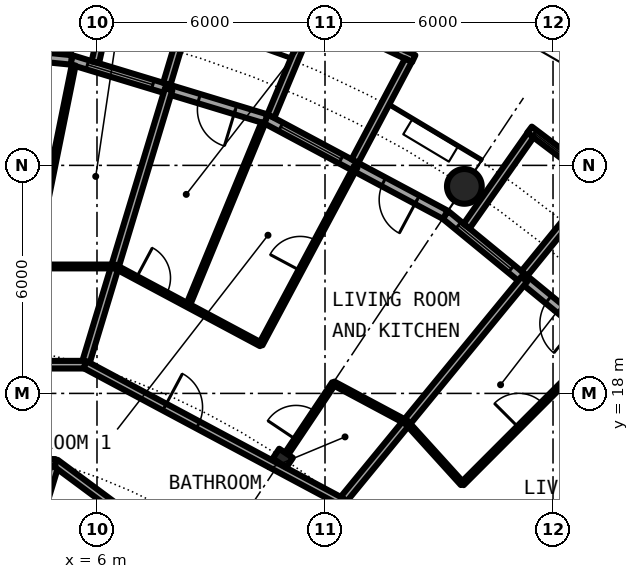
"""IFC4 building model, lengths in metres.
Left out: names, types, materials, properties, quantities, classifications, styles, units other than length and angle.
Written with IfcOpenShell. Run it as: python <this file> out.ifc"""

import sys

from ifc_helpers import new_model, si_unit, direction, frame, frame_2d, origin, origin_2d, place, context, subcontext, project, spatial, rectangle, circle, hollow_circle, i_section, extrude, element, fill, save


model = new_model("IFC4")
c1 = context("Model", 3, precision=1e-05, world=origin(), true_north=direction((0.0, 1.0)))
c2 = subcontext(c1, "Body", "Model", "MODEL_VIEW")
j1 = project(units=[si_unit("LENGTHUNIT", "METRE"), si_unit("PLANEANGLEUNIT", "RADIAN")], contexts=[c1])
p1 = place(None, origin())
s1 = spatial("IfcSite", under=j1, at=p1, CompositionType="ELEMENT")
p2 = place(p1, origin())
s2 = spatial("IfcBuilding", under=s1, at=p2, CompositionType="ELEMENT")
p3 = place(p2, frame((0.0, 0.0, 120.8)))
s3 = spatial("IfcBuildingStorey", under=s2, at=p3, CompositionType="ELEMENT", Elevation=120.8)
p4 = place(p3, frame((15.667, 23.448, 0.0), z_axis=(0.0, 0.0, 1.0), x_axis=(1.0, 0.0, 0.0)))
e1 = element("IfcColumn", 1, at=p4, inside=s3, PredefinedType="COLUMN", context=c2, shape_type="SweptSolid", body=[
    extrude(hollow_circle(Radius=0.457, WallThickness=0.04, at=origin_2d()), origin(), (0.0, 0.0, 1.0), 3.05),
])
p5 = place(p3, frame((10.889, 16.297, 0.0), z_axis=(0.0, 0.0, 1.0), x_axis=(0.55557023302, 0.831469612303, 0.0)))
e2 = element("IfcColumn", 2, at=p5, inside=s3, PredefinedType="COLUMN", context=c2, shape_type="SweptSolid", body=[
    extrude(i_section(OverallWidth=0.307, OverallDepth=0.432, WebThickness=0.021, FlangeThickness=0.04, FilletRadius=0.027, at=origin_2d()), origin(), (0.0, 0.0, 1.0), 3.05),
])
p6 = place(p3, frame((19.304, 19.304, 0.0), z_axis=(0.0, 0.0, 1.0), x_axis=(-0.773019449054, 0.634382322723, 0.0)))
e3 = element("IfcWall", 3, at=p6, inside=s3, PredefinedType="SOLIDWALL", context=c2, shape_type="SweptSolid", body=[
    extrude(rectangle(XDim=5.352, YDim=0.25, at=frame_2d((2.676, 0.0))), origin(), (0.0, 0.0, 1.0), 2.7),
])
p7 = place(p6, frame((0.841, 0.0, 0.0)))
e4 = element("IfcOpeningElement", 4, at=p7, cuts=e3, PredefinedType="OPENING", context=c2, shape_type="SweptSolid", body=[
    extrude(rectangle(XDim=1.0, YDim=2.2, at=frame_2d((0.5, 1.1))), frame((0.0, 0.135, 0.0), z_axis=(0.0, -1.0, 0.0), x_axis=(1.0, 0.0, 0.0)), (0.0, 0.0, 1.0), 0.27),
])
p8 = place(p6, frame((3.111, 0.0, 0.3)))
e5 = element("IfcOpeningElement", 5, at=p8, cuts=e3, PredefinedType="OPENING", context=c2, shape_type="SweptSolid", body=[
    extrude(rectangle(XDim=1.8, YDim=2.1, at=frame_2d((0.9, 1.05))), frame((0.0, 0.135, 0.0), z_axis=(0.0, -1.0, 0.0), x_axis=(1.0, 0.0, 0.0)), (0.0, 0.0, 1.0), 0.27),
])
p9 = place(p3, frame((19.289, 23.497, -0.03), z_axis=(0.0, 0.0, 1.0), x_axis=(-0.797456837111, 0.603375996329, 0.0)))
e6 = element("IfcWall", 6, at=p9, inside=s3, PredefinedType="SOLIDWALL", context=c2, shape_type="SweptSolid", body=[
    extrude(rectangle(XDim=2.391, YDim=0.2, at=frame_2d((1.196, 0.0))), origin(), (0.0, 0.0, 1.0), 2.73),
])
p10 = place(p9, frame((0.156, 0.0, 0.33)))
e7 = element("IfcOpeningElement", 7, at=p10, cuts=e6, PredefinedType="OPENING", context=c2, shape_type="SweptSolid", body=[
    extrude(circle(Radius=1.04, at=frame_2d((1.04, 1.04))), frame((0.0, 0.11, 0.0), z_axis=(0.0, -1.0, 0.0), x_axis=(1.0, 0.0, 0.0)), (0.0, 0.0, 1.0), 0.22),
])
p11 = place(p3, frame((17.246, 21.155, -0.03), z_axis=(0.0, 0.0, 1.0), x_axis=(0.631741648902, 0.775179004516, 0.0)))
e8 = element("IfcWall", 8, at=p11, inside=s3, PredefinedType="SOLIDWALL", context=c2, shape_type="SweptSolid", body=[
    extrude(rectangle(XDim=3.006, YDim=0.2, at=frame_2d((1.503, 0.0))), origin(), (0.0, 0.0, 1.0), 2.73),
])
p12 = place(p3, frame((15.726, 22.402, -0.03), z_axis=(0.0, 0.0, 1.0), x_axis=(0.574826383135, 0.818275399393, 0.0)))
e9 = element("IfcWall", 9, at=p12, inside=s3, PredefinedType="SOLIDWALL", context=c2, shape_type="SweptSolid", body=[
    extrude(rectangle(XDim=2.929, YDim=0.2, at=frame_2d((1.465, 0.0))), origin(), (0.0, 0.0, 1.0), 2.73),
])
p13 = place(p3, frame((15.167, 22.699, 0.0), z_axis=(0.0, 0.0, 1.0), x_axis=(-0.881915646801, 0.471407246368, 0.0)))
e10 = element("IfcWall", 10, at=p13, inside=s3, PredefinedType="SOLIDWALL", context=c2, shape_type="SweptSolid", body=[
    extrude(rectangle(XDim=5.352, YDim=0.25, at=frame_2d((2.676, 0.0))), origin(), (0.0, 0.0, 1.0), 2.7),
])
p14 = place(p13, frame((0.841, 0.0, 0.0)))
e11 = element("IfcOpeningElement", 11, at=p14, cuts=e10, PredefinedType="OPENING", context=c2, shape_type="SweptSolid", body=[
    extrude(rectangle(XDim=1.0, YDim=2.2, at=frame_2d((0.5, 1.1))), frame((0.0, 0.135, 0.0), z_axis=(0.0, -1.0, 0.0), x_axis=(1.0, 0.0, 0.0)), (0.0, 0.0, 1.0), 0.27),
])
p15 = place(p13, frame((3.111, 0.0, 0.3)))
e12 = element("IfcOpeningElement", 12, at=p15, cuts=e10, PredefinedType="OPENING", context=c2, shape_type="SweptSolid", body=[
    extrude(rectangle(XDim=1.8, YDim=2.1, at=frame_2d((0.9, 1.05))), frame((0.0, 0.135, 0.0), z_axis=(0.0, -1.0, 0.0), x_axis=(1.0, 0.0, 0.0)), (0.0, 0.0, 1.0), 0.27),
])
p16 = place(p3, frame((14.335, 26.808, -0.03), z_axis=(0.0, 0.0, 1.0), x_axis=(-0.904000060331, 0.427532327342, 0.0)))
e13 = element("IfcWall", 13, at=p16, inside=s3, PredefinedType="SOLIDWALL", context=c2, shape_type="SweptSolid", body=[
    extrude(rectangle(XDim=2.993, YDim=0.2, at=frame_2d((1.497, 0.0))), origin(), (0.0, 0.0, 1.0), 2.73),
])
p17 = place(p16, frame((0.457, 0.0, 0.33)))
e14 = element("IfcOpeningElement", 14, at=p17, cuts=e13, PredefinedType="OPENING", context=c2, shape_type="SweptSolid", body=[
    extrude(circle(Radius=1.04, at=frame_2d((1.04, 1.04))), frame((0.0, 0.11, 0.0), z_axis=(0.0, -1.0, 0.0), x_axis=(1.0, 0.0, 0.0)), (0.0, 0.0, 1.0), 0.22),
])
p18 = place(p3, frame((12.787, 24.113, -0.03), z_axis=(0.0, 0.0, 1.0), x_axis=(0.468365282436, 0.883534924159, 0.0)))
e15 = element("IfcWall", 15, at=p18, inside=s3, PredefinedType="SOLIDWALL", context=c2, shape_type="SweptSolid", body=[
    extrude(rectangle(XDim=3.006, YDim=0.2, at=frame_2d((1.503, 0.0))), origin(), (0.0, 0.0, 1.0), 2.73),
])
p19 = place(p3, frame((10.575, 25.295, -0.03), z_axis=(0.0, 0.0, 1.0), x_axis=(0.385697364644, 0.922625353492, 0.0)))
e16 = element("IfcWall", 16, at=p19, inside=s3, PredefinedType="SOLIDWALL", context=c2, shape_type="SweptSolid", body=[
    extrude(rectangle(XDim=2.883, YDim=0.2, at=frame_2d((1.442, 0.0))), origin(), (0.0, 0.0, 1.0), 2.73),
])
p20 = place(p3, frame((10.447, 25.222, 0.0), z_axis=(0.0, 0.0, 1.0), x_axis=(-0.956965678721, 0.290201119486, 0.0)))
e17 = element("IfcWall", 17, at=p20, inside=s3, PredefinedType="SOLIDWALL", context=c2, shape_type="SweptSolid", body=[
    extrude(rectangle(XDim=5.351, YDim=0.25, at=frame_2d((2.676, 0.0))), origin(), (0.0, 0.0, 1.0), 2.7),
])
p21 = place(p20, frame((0.841, 0.0, 0.0)))
e18 = element("IfcOpeningElement", 18, at=p21, cuts=e17, PredefinedType="OPENING", context=c2, shape_type="SweptSolid", body=[
    extrude(rectangle(XDim=1.0, YDim=2.2, at=frame_2d((0.5, 1.1))), frame((0.0, 0.135, 0.0), z_axis=(0.0, -1.0, 0.0), x_axis=(1.0, 0.0, 0.0)), (0.0, 0.0, 1.0), 0.27),
])
p22 = place(p20, frame((3.111, 0.0, 0.3)))
e19 = element("IfcOpeningElement", 19, at=p22, cuts=e17, PredefinedType="OPENING", context=c2, shape_type="SweptSolid", body=[
    extrude(rectangle(XDim=1.8, YDim=2.1, at=frame_2d((0.9, 1.05))), frame((0.0, 0.135, 0.0), z_axis=(0.0, -1.0, 0.0), x_axis=(1.0, 0.0, 0.0)), (0.0, 0.0, 1.0), 0.27),
])
p23 = place(p3, frame((7.837, 26.144, -0.03), z_axis=(0.0, 0.0, 1.0), x_axis=(0.287064767992, 0.957911174889, 0.0)))
e20 = element("IfcWall", 20, at=p23, inside=s3, PredefinedType="SOLIDWALL", context=c2, shape_type="SweptSolid", body=[
    extrude(rectangle(XDim=3.006, YDim=0.2, at=frame_2d((1.503, 0.0))), origin(), (0.0, 0.0, 1.0), 2.73),
])
p24 = place(p3, frame((5.957, 26.715, -0.03), z_axis=(0.0, 0.0, 1.0), x_axis=(0.217857287091, 0.975980636315, 0.0)))
e21 = element("IfcWall", 21, at=p24, inside=s3, PredefinedType="SOLIDWALL", context=c2, shape_type="SweptSolid", body=[
    extrude(rectangle(XDim=2.928, YDim=0.2, at=frame_2d((1.464, 0.0))), origin(), (0.0, 0.0, 1.0), 2.73),
])
p25 = place(p3, frame((5.326, 26.775, 0.0), z_axis=(0.0, 0.0, 1.0), x_axis=(-0.995173996315, 0.098126026407, 0.0)))
e22 = element("IfcWall", 22, at=p25, inside=s3, PredefinedType="SOLIDWALL", context=c2, shape_type="SweptSolid", body=[
    extrude(rectangle(XDim=5.352, YDim=0.25, at=frame_2d((2.676, 0.0))), origin(), (0.0, 0.0, 1.0), 2.7),
])
p26 = place(p25, frame((0.841, 0.0, 0.0)))
e23 = element("IfcOpeningElement", 23, at=p26, cuts=e22, PredefinedType="OPENING", context=c2, shape_type="SweptSolid", body=[
    extrude(rectangle(XDim=1.0, YDim=2.2, at=frame_2d((0.5, 1.1))), frame((0.0, 0.135, 0.0), z_axis=(0.0, -1.0, 0.0), x_axis=(1.0, 0.0, 0.0)), (0.0, 0.0, 1.0), 0.27),
])
p27 = place(p25, frame((3.111, 0.0, 0.3)))
e24 = element("IfcOpeningElement", 24, at=p27, cuts=e22, PredefinedType="OPENING", context=c2, shape_type="SweptSolid", body=[
    extrude(rectangle(XDim=1.8, YDim=2.1, at=frame_2d((0.9, 1.05))), frame((0.0, 0.135, 0.0), z_axis=(0.0, -1.0, 0.0), x_axis=(1.0, 0.0, 0.0)), (0.0, 0.0, 1.0), 0.27),
])
p28 = place(p3, frame((2.245, 7.387, 0.0), z_axis=(0.0, 0.0, 1.0), x_axis=(0.289977130626, 0.957033575019, 0.0)))
e25 = element("IfcWall", 25, at=p28, inside=s3, PredefinedType="PARTITIONING", context=c2, shape_type="SweptSolid", body=[
    extrude(rectangle(XDim=9.18, YDim=0.2, at=frame_2d((4.59, 0.0))), origin(), (0.0, 0.0, 1.0), 2.7),
])
p29 = place(p3, frame((5.69, 18.756, 0.0), z_axis=(0.0, 0.0, 1.0), x_axis=(0.29005838641, 0.957008951094, 0.0)))
e26 = element("IfcWall", 26, at=p29, inside=s3, PredefinedType="PARTITIONING", context=c2, shape_type="SweptSolid", body=[
    extrude(rectangle(XDim=7.574, YDim=0.2, at=frame_2d((3.787, 0.0))), origin(), (0.0, 0.0, 1.0), 2.7),
])
p30 = place(p3, frame((4.316, 21.34, 0.0), z_axis=(0.0, 0.0, 1.0), x_axis=(0.198227216881, 0.98015609496, 0.0)))
e27 = element("IfcWall", 27, at=p30, inside=s3, PredefinedType="PARTITIONING", context=c2, shape_type="SweptSolid", body=[
    extrude(rectangle(XDim=5.403, YDim=0.1, at=frame_2d((2.702, 0.0))), origin(), (0.0, 0.0, 1.0), 2.7),
])
p31 = place(p30, frame((2.252, 0.0, 0.0)))
e28 = element("IfcOpeningElement", 28, at=p31, cuts=e27, PredefinedType="OPENING", context=c2, shape_type="SweptSolid", body=[
    extrude(rectangle(XDim=0.9, YDim=2.3, at=frame_2d((0.45, 1.15))), frame((0.0, 0.06, 0.0), z_axis=(0.0, -1.0, 0.0), x_axis=(1.0, 0.0, 0.0)), (0.0, 0.0, 1.0), 0.12),
])
p32 = place(p3, frame((8.392, 20.314, 0.0), z_axis=(0.0, 0.0, 1.0), x_axis=(0.381673756215, 0.924297107978, 0.0)))
e29 = element("IfcWall", 29, at=p32, inside=s3, PredefinedType="PARTITIONING", context=c2, shape_type="SweptSolid", body=[
    extrude(rectangle(XDim=5.195, YDim=0.1, at=frame_2d((2.598, 0.0))), origin(), (0.0, 0.0, 1.0), 2.7),
])
p33 = place(p3, frame((10.31, 19.289, 0.0), z_axis=(0.0, 0.0, 1.0), x_axis=(0.47140999111, 0.881914179658, 0.0)))
e30 = element("IfcWall", 30, at=p33, inside=s3, PredefinedType="PARTITIONING", context=c2, shape_type="SweptSolid", body=[
    extrude(rectangle(XDim=5.303, YDim=0.1, at=frame_2d((2.652, 0.0))), origin(), (0.0, 0.0, 1.0), 2.7),
])
p34 = place(p33, frame((2.202, 0.0, 0.0)))
e31 = element("IfcOpeningElement", 31, at=p34, cuts=e30, PredefinedType="OPENING", context=c2, shape_type="SweptSolid", body=[
    extrude(rectangle(XDim=0.9, YDim=2.3, at=frame_2d((0.45, 1.15))), frame((0.0, 0.06, 0.0), z_axis=(0.0, -1.0, 0.0), x_axis=(1.0, 0.0, 0.0)), (0.0, 0.0, 1.0), 0.12),
])
p35 = place(p3, frame((11.025, 16.466, 0.0), z_axis=(0.0, 0.0, 1.0), x_axis=(0.556469477731, 0.830868052313, 0.0)))
e32 = element("IfcWall", 32, at=p35, inside=s3, PredefinedType="PARTITIONING", context=c2, shape_type="SweptSolid", body=[
    extrude(rectangle(XDim=2.164, YDim=0.1, at=frame_2d((1.082, 0.0))), origin(), (0.0, 0.0, 1.0), 2.7),
])
p36 = place(p35, frame((0.383, 0.0, 0.0)))
e33 = element("IfcOpeningElement", 33, at=p36, cuts=e32, PredefinedType="OPENING", context=c2, shape_type="SweptSolid", body=[
    extrude(rectangle(XDim=0.9, YDim=2.3, at=frame_2d((0.45, 1.15))), frame((0.0, 0.06, 0.0), z_axis=(0.0, -1.0, 0.0), x_axis=(1.0, 0.0, 0.0)), (0.0, 0.0, 1.0), 0.12),
])
p37 = place(p3, frame((12.436, 15.149, 0.0), z_axis=(0.0, 0.0, 1.0), x_axis=(0.63447412651, 0.772944100689, 0.0)))
e34 = element("IfcWall", 34, at=p37, inside=s3, PredefinedType="PARTITIONING", context=c2, shape_type="SweptSolid", body=[
    extrude(rectangle(XDim=7.576, YDim=0.2, at=frame_2d((3.788, 0.0))), origin(), (0.0, 0.0, 1.0), 2.7),
])
p38 = place(p3, frame((15.613, 15.621, 0.0), z_axis=(0.0, 0.0, 1.0), x_axis=(0.706914880313, 0.707298629994, 0.0)))
e35 = element("IfcWall", 35, at=p38, inside=s3, PredefinedType="PARTITIONING", context=c2, shape_type="SweptSolid", body=[
    extrude(rectangle(XDim=5.09, YDim=0.1, at=frame_2d((2.545, 0.0))), origin(), (0.0, 0.0, 1.0), 2.7),
])
p39 = place(p38, frame((2.095, 0.0, 0.0)))
e36 = element("IfcOpeningElement", 36, at=p39, cuts=e35, PredefinedType="OPENING", context=c2, shape_type="SweptSolid", body=[
    extrude(rectangle(XDim=0.9, YDim=2.3, at=frame_2d((0.45, 1.15))), frame((0.0, 0.06, 0.0), z_axis=(0.0, -1.0, 0.0), x_axis=(1.0, 0.0, 0.0)), (0.0, 0.0, 1.0), 0.12),
])
p40 = place(p3, frame((4.906, 16.172, 0.0), z_axis=(0.0, 0.0, 1.0), x_axis=(0.803204584823, -0.59570327758, 0.0)))
e37 = element("IfcWall", 37, at=p40, inside=s3, PredefinedType="PARTITIONING", context=c2, shape_type="SweptSolid", body=[
    extrude(rectangle(XDim=11.387, YDim=0.2, at=frame_2d((5.693, 0.0))), origin(), (0.0, 0.0, 1.0), 2.7),
])
p41 = place(p40, frame((4.38, 0.0, 0.0)))
e38 = element("IfcOpeningElement", 38, at=p41, cuts=e37, PredefinedType="OPENING", context=c2, shape_type="SweptSolid", body=[
    extrude(rectangle(XDim=1.0, YDim=2.3, at=frame_2d((0.5, 1.15))), frame((0.0, 0.11, 0.0), z_axis=(0.0, -1.0, 0.0), x_axis=(1.0, 0.0, 0.0)), (0.0, 0.0, 1.0), 0.22),
])
p42 = place(p3, frame((-4.906, 16.172, 0.0), z_axis=(0.0, 0.0, 1.0), x_axis=(1.0, 0.0, 0.0)))
e39 = element("IfcWall", 39, at=p42, inside=s3, PredefinedType="PARTITIONING", context=c2, shape_type="SweptSolid", body=[
    extrude(rectangle(XDim=9.812, YDim=0.2, at=frame_2d((4.906, 0.0))), origin(), (0.0, 0.0, 1.0), 2.7),
])
p43 = place(p42, frame((4.406, 0.0, 0.0)))
e40 = element("IfcOpeningElement", 40, at=p43, cuts=e39, PredefinedType="OPENING", context=c2, shape_type="SweptSolid", body=[
    extrude(rectangle(XDim=1.0, YDim=2.3, at=frame_2d((0.5, 1.15))), frame((0.0, 0.11, 0.0), z_axis=(0.0, -1.0, 0.0), x_axis=(1.0, 0.0, 0.0)), (0.0, 0.0, 1.0), 0.22),
])
p44 = place(p3, frame((-5.69, 18.756, 0.0), z_axis=(0.0, 0.0, 1.0), x_axis=(1.0, 0.0, 0.0)))
e41 = element("IfcWall", 41, at=p44, inside=s3, PredefinedType="PARTITIONING", context=c2, shape_type="SweptSolid", body=[
    extrude(rectangle(XDim=11.38, YDim=0.2, at=frame_2d((5.69, 0.0))), origin(), (0.0, 0.0, 1.0), 2.7),
])
p45 = place(p44, frame((3.294, 0.0, 0.0)))
e42 = element("IfcOpeningElement", 42, at=p45, cuts=e41, PredefinedType="OPENING", context=c2, shape_type="SweptSolid", body=[
    extrude(rectangle(XDim=1.0, YDim=2.3, at=frame_2d((0.5, 1.15))), frame((0.0, 0.11, 0.0), z_axis=(0.0, -1.0, 0.0), x_axis=(1.0, 0.0, 0.0)), (0.0, 0.0, 1.0), 0.22),
])
p46 = place(p3, frame((5.687, 18.757, 0.0), z_axis=(0.0, 0.0, 1.0), x_axis=(0.8819312112, -0.471378127104, 0.0)))
e43 = element("IfcWall", 43, at=p46, inside=s3, PredefinedType="PARTITIONING", context=c2, shape_type="SweptSolid", body=[
    extrude(rectangle(XDim=7.65, YDim=0.2, at=frame_2d((3.825, 0.0))), origin(), (0.0, 0.0, 1.0), 2.39),
])
p47 = place(p46, frame((2.371, 0.0, 0.0)))
e44 = element("IfcOpeningElement", 44, at=p47, cuts=e43, PredefinedType="OPENING", context=c2, shape_type="SweptSolid", body=[
    extrude(rectangle(XDim=1.0, YDim=2.3, at=frame_2d((0.5, 1.15))), frame((0.0, 0.11, 0.0), z_axis=(0.0, -1.0, 0.0), x_axis=(1.0, 0.0, 0.0)), (0.0, 0.0, 1.0), 0.22),
])
p48 = place(p3, frame((12.434, 15.151, 0.0), z_axis=(0.0, 0.0, 1.0), x_axis=(0.671481997275, -0.741020868354, 0.0)))
e45 = element("IfcWall", 45, at=p48, inside=s3, PredefinedType="PARTITIONING", context=c2, shape_type="SweptSolid", body=[
    extrude(rectangle(XDim=5.596, YDim=0.2, at=frame_2d((2.798, 0.0))), origin(), (0.0, 0.0, 1.0), 2.39),
])
p49 = place(p48, frame((1.417, 0.0, 0.0)))
e46 = element("IfcOpeningElement", 46, at=p49, cuts=e45, PredefinedType="OPENING", context=c2, shape_type="SweptSolid", body=[
    extrude(rectangle(XDim=1.0, YDim=2.3, at=frame_2d((0.5, 1.15))), frame((0.0, 0.11, 0.0), z_axis=(0.0, -1.0, 0.0), x_axis=(1.0, 0.0, 0.0)), (0.0, 0.0, 1.0), 0.22),
])
p50 = place(p3, frame((0.0, 21.34, 0.0), z_axis=(0.0, 0.0, 1.0), x_axis=(1.0, 0.0, 0.0)))
e47 = element("IfcWall", 47, at=p50, inside=s3, PredefinedType="PARTITIONING", context=c2, shape_type="SweptSolid", body=[
    extrude(rectangle(XDim=6.473, YDim=0.1, at=frame_2d((3.236, 0.0))), origin(), (0.0, 0.0, 1.0), 2.7),
])
p51 = place(p3, frame((6.471, 21.341, 0.0), z_axis=(0.0, 0.0, 1.0), x_axis=(0.881932070463, -0.471376519451, 0.0)))
e48 = element("IfcWall", 48, at=p51, inside=s3, PredefinedType="PARTITIONING", context=c2, shape_type="SweptSolid", body=[
    extrude(rectangle(XDim=4.355, YDim=0.1, at=frame_2d((2.178, 0.0))), origin(), (0.0, 0.0, 1.0), 2.7),
])
p52 = place(p51, frame((0.639, 0.0, 0.0)))
e49 = element("IfcOpeningElement", 49, at=p52, cuts=e48, PredefinedType="OPENING", context=c2, shape_type="SweptSolid", body=[
    extrude(rectangle(XDim=0.9, YDim=2.3, at=frame_2d((0.45, 1.15))), frame((0.0, 0.06, 0.0), z_axis=(0.0, -1.0, 0.0), x_axis=(1.0, 0.0, 0.0)), (0.0, 0.0, 1.0), 0.12),
])
p53 = place(p3, frame((12.223, 18.267, 0.0), z_axis=(0.0, 0.0, 1.0), x_axis=(0.881765102974, -0.47168877788, 0.0)))
e50 = element("IfcWall", 50, at=p53, inside=s3, PredefinedType="PARTITIONING", context=c2, shape_type="SweptSolid", body=[
    extrude(rectangle(XDim=2.176, YDim=0.1, at=frame_2d((1.088, 0.0))), origin(), (0.0, 0.0, 1.0), 2.7),
])
p54 = place(p3, frame((14.147, 17.238, 0.0), z_axis=(0.0, 0.0, 1.0), x_axis=(0.671674967707, -0.740845960882, 0.0)))
e51 = element("IfcWall", 51, at=p54, inside=s3, PredefinedType="PARTITIONING", context=c2, shape_type="SweptSolid", body=[
    extrude(rectangle(XDim=2.181, YDim=0.1, at=frame_2d((1.091, 0.0))), origin(), (0.0, 0.0, 1.0), 2.7),
])
p55 = place(p7, origin())
e52 = element("IfcDoor", 52, at=p55, inside=s3, OperationType="SINGLE_SWING_LEFT", PredefinedType="DOOR", context=c2, shape_type="SweptSolid", body=[
    extrude(rectangle(XDim=1.0, YDim=2.2, at=frame_2d((0.5, 1.1))), frame((0.0, 0.025, 0.0), z_axis=(0.0, -1.0, 0.0), x_axis=(1.0, 0.0, 0.0)), (0.0, 0.0, 1.0), 0.05),
])
fill(e4, e52)
p56 = place(p8, origin())
e53 = element("IfcWindow", 53, at=p56, inside=s3, PartitioningType="SINGLE_PANEL", PredefinedType="WINDOW", context=c2, shape_type="SweptSolid", body=[
    extrude(rectangle(XDim=1.8, YDim=2.1, at=frame_2d((0.9, 1.05))), frame((0.0, 0.03, 0.0), z_axis=(0.0, -1.0, 0.0), x_axis=(1.0, 0.0, 0.0)), (0.0, 0.0, 1.0), 0.06),
])
fill(e5, e53)
p57 = place(p10, origin())
e54 = element("IfcWindow", 54, at=p57, inside=s3, PartitioningType="SINGLE_PANEL", PredefinedType="WINDOW", context=c2, shape_type="SweptSolid", body=[
    extrude(circle(Radius=1.04, at=frame_2d((1.04, 1.04))), frame((0.0, 0.03, 0.0), z_axis=(0.0, -1.0, 0.0), x_axis=(1.0, 0.0, 0.0)), (0.0, 0.0, 1.0), 0.06),
])
fill(e7, e54)
p58 = place(p14, origin())
e55 = element("IfcDoor", 55, at=p58, inside=s3, OperationType="SINGLE_SWING_LEFT", PredefinedType="DOOR", context=c2, shape_type="SweptSolid", body=[
    extrude(rectangle(XDim=1.0, YDim=2.2, at=frame_2d((0.5, 1.1))), frame((0.0, 0.025, 0.0), z_axis=(0.0, -1.0, 0.0), x_axis=(1.0, 0.0, 0.0)), (0.0, 0.0, 1.0), 0.05),
])
fill(e11, e55)
p59 = place(p15, origin())
e56 = element("IfcWindow", 56, at=p59, inside=s3, PartitioningType="SINGLE_PANEL", PredefinedType="WINDOW", context=c2, shape_type="SweptSolid", body=[
    extrude(rectangle(XDim=1.8, YDim=2.1, at=frame_2d((0.9, 1.05))), frame((0.0, 0.03, 0.0), z_axis=(0.0, -1.0, 0.0), x_axis=(1.0, 0.0, 0.0)), (0.0, 0.0, 1.0), 0.06),
])
fill(e12, e56)
p60 = place(p21, origin())
e57 = element("IfcDoor", 57, at=p60, inside=s3, OperationType="SINGLE_SWING_LEFT", PredefinedType="DOOR", context=c2, shape_type="SweptSolid", body=[
    extrude(rectangle(XDim=1.0, YDim=2.2, at=frame_2d((0.5, 1.1))), frame((0.0, 0.025, 0.0), z_axis=(0.0, -1.0, 0.0), x_axis=(1.0, 0.0, 0.0)), (0.0, 0.0, 1.0), 0.05),
])
fill(e18, e57)
p61 = place(p22, origin())
e58 = element("IfcWindow", 58, at=p61, inside=s3, PartitioningType="SINGLE_PANEL", PredefinedType="WINDOW", context=c2, shape_type="SweptSolid", body=[
    extrude(rectangle(XDim=1.8, YDim=2.1, at=frame_2d((0.9, 1.05))), frame((0.0, 0.03, 0.0), z_axis=(0.0, -1.0, 0.0), x_axis=(1.0, 0.0, 0.0)), (0.0, 0.0, 1.0), 0.06),
])
fill(e19, e58)
p62 = place(p39, origin())
e59 = element("IfcDoor", 59, at=p62, inside=s3, OperationType="SINGLE_SWING_RIGHT", PredefinedType="DOOR", context=c2, shape_type="SweptSolid", body=[
    extrude(rectangle(XDim=0.9, YDim=2.3, at=frame_2d((0.45, 1.15))), frame((0.0, 0.025, 0.0), z_axis=(0.0, -1.0, 0.0), x_axis=(1.0, 0.0, 0.0)), (0.0, 0.0, 1.0), 0.05),
])
fill(e36, e59)
p63 = place(p47, origin())
e60 = element("IfcDoor", 60, at=p63, inside=s3, OperationType="SINGLE_SWING_LEFT", PredefinedType="DOOR", context=c2, shape_type="SweptSolid", body=[
    extrude(rectangle(XDim=1.0, YDim=2.3, at=frame_2d((0.5, 1.15))), frame((0.0, 0.025, 0.0), z_axis=(0.0, -1.0, 0.0), x_axis=(1.0, 0.0, 0.0)), (0.0, 0.0, 1.0), 0.05),
])
fill(e44, e60)
p64 = place(p36, origin())
e61 = element("IfcDoor", 61, at=p64, inside=s3, OperationType="SINGLE_SWING_LEFT", PredefinedType="DOOR", context=c2, shape_type="SweptSolid", body=[
    extrude(rectangle(XDim=0.9, YDim=2.3, at=frame_2d((0.45, 1.15))), frame((0.0, 0.025, 0.0), z_axis=(0.0, -1.0, 0.0), x_axis=(1.0, 0.0, 0.0)), (0.0, 0.0, 1.0), 0.05),
])
fill(e33, e61)
p65 = place(p34, origin())
e62 = element("IfcDoor", 62, at=p65, inside=s3, OperationType="SINGLE_SWING_RIGHT", PredefinedType="DOOR", context=c2, shape_type="SweptSolid", body=[
    extrude(rectangle(XDim=0.9, YDim=2.3, at=frame_2d((0.45, 1.15))), frame((0.0, 0.025, 0.0), z_axis=(0.0, -1.0, 0.0), x_axis=(1.0, 0.0, 0.0)), (0.0, 0.0, 1.0), 0.05),
])
fill(e31, e62)
p66 = place(p52, origin())
e63 = element("IfcDoor", 63, at=p66, inside=s3, OperationType="SINGLE_SWING_LEFT", PredefinedType="DOOR", context=c2, shape_type="SweptSolid", body=[
    extrude(rectangle(XDim=0.9, YDim=2.3, at=frame_2d((0.45, 1.15))), frame((0.0, 0.025, 0.0), z_axis=(0.0, -1.0, 0.0), x_axis=(1.0, 0.0, 0.0)), (0.0, 0.0, 1.0), 0.05),
])
fill(e49, e63)
p67 = place(p31, origin())
e64 = element("IfcDoor", 64, at=p67, inside=s3, OperationType="SINGLE_SWING_RIGHT", PredefinedType="DOOR", context=c2, shape_type="SweptSolid", body=[
    extrude(rectangle(XDim=0.9, YDim=2.3, at=frame_2d((0.45, 1.15))), frame((0.0, 0.025, 0.0), z_axis=(0.0, -1.0, 0.0), x_axis=(1.0, 0.0, 0.0)), (0.0, 0.0, 1.0), 0.05),
])
fill(e28, e64)
save(model, sys.argv[1])
